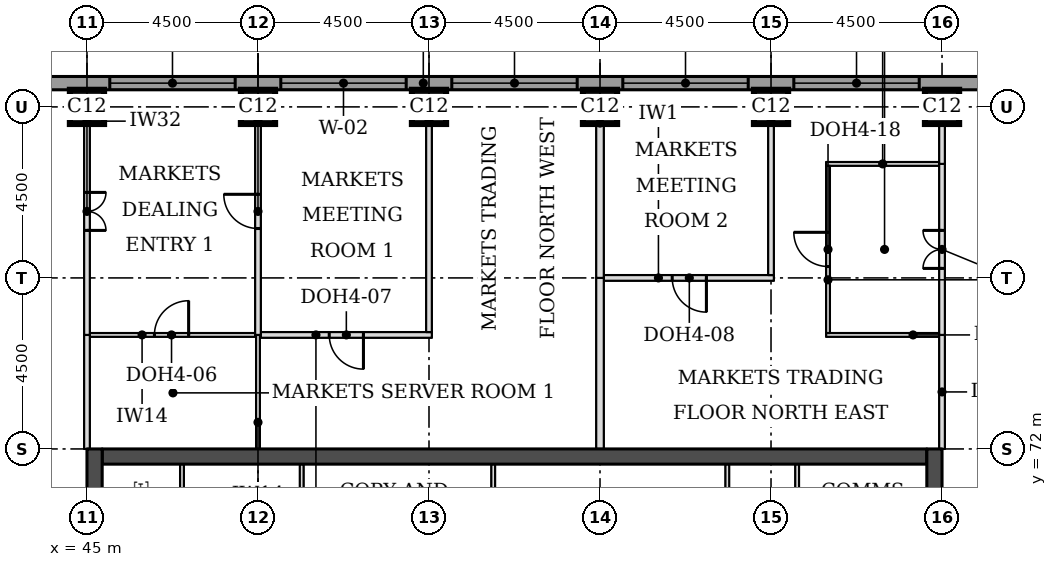
"""IFC4 building model, lengths in metres.
Left out: names, types, materials, properties, quantities, classifications, styles, units other than length and angle.
Written with IfcOpenShell. Run it as: python <this file> out.ifc"""

import sys

from ifc_helpers import new_model, si_unit, direction, frame, frame_2d, origin, origin_2d, place, context, subcontext, project, spatial, rectangle, extrude, element, fill, save


model = new_model("IFC4")
c1 = context("Model", 3, precision=1e-05, world=origin(), true_north=direction((0.0, 1.0)))
c2 = subcontext(c1, "Body", "Model", "MODEL_VIEW")
j1 = project(units=[si_unit("LENGTHUNIT", "METRE"), si_unit("PLANEANGLEUNIT", "RADIAN")], contexts=[c1])
p1 = place(None, origin())
s1 = spatial("IfcSite", under=j1, at=p1, CompositionType="ELEMENT")
p2 = place(p1, origin())
s2 = spatial("IfcBuilding", under=s1, at=p2, CompositionType="ELEMENT")
p3 = place(p2, frame((0.0, 0.0, 173.6)))
s3 = spatial("IfcBuildingStorey", under=s2, at=p3, CompositionType="ELEMENT", Elevation=173.6)
for number, where, z_axis, x_axis in (
    (1, (45.0, 81.0, 0.0), (0.0, 0.0, 1.0), (1.0, 0.0, 0.0)),
    (2, (49.5, 81.0, 0.0), (0.0, 0.0, 1.0), (1.0, 0.0, 0.0)),
    (3, (54.0, 81.0, 0.0), (0.0, 0.0, 1.0), (1.0, 0.0, 0.0)),
    (4, (58.5, 81.0, 0.0), (0.0, 0.0, 1.0), (1.0, 0.0, 0.0)),
    (5, (63.0, 81.0, 0.0), (0.0, 0.0, 1.0), (1.0, 0.0, 0.0)),
    (6, (67.5, 81.0, 0.0), (0.0, 0.0, 1.0), (1.0, 0.0, 0.0)),
):
    element("IfcColumn", number, at=place(p3, frame(where, z_axis=z_axis, x_axis=x_axis)), inside=s3, PredefinedType="COLUMN", context=c2, shape_type="SweptSolid", body=[
        extrude(rectangle(XDim=0.9, YDim=0.9, at=origin_2d()), origin(), (0.0, 0.0, 1.0), 3.7),
    ])
p4 = place(p3, frame((45.4, 71.8, 0.0), z_axis=(0.0, 0.0, 1.0), x_axis=(1.0, 0.0, 0.0)))
e7 = element("IfcWall", 7, at=p4, inside=s3, PredefinedType="SHEAR", context=c2, shape_type="SweptSolid", body=[
    extrude(rectangle(XDim=21.7, YDim=0.4, at=frame_2d((10.85, 0.0))), origin(), (0.0, 0.0, 1.0), 3.7),
])
p5 = place(p3, frame((45.2, 49.5, 0.0), z_axis=(0.0, 0.0, 1.0), x_axis=(0.0, 1.0, 0.0)))
e8 = element("IfcWall", 8, at=p5, inside=s3, PredefinedType="SHEAR", context=c2, shape_type="SweptSolid", body=[
    extrude(rectangle(XDim=22.5, YDim=0.4, at=frame_2d((11.25, 0.0))), origin(), (0.0, 0.0, 1.0), 3.7),
])
p6 = place(p5, frame((4.2, 0.0, 0.0)))
e9 = element("IfcOpeningElement", 9, at=p6, cuts=e8, PredefinedType="OPENING", context=c2, shape_type="SweptSolid", body=[
    extrude(rectangle(XDim=1.8, YDim=2.1, at=frame_2d((0.9, 1.05))), frame((0.0, 0.21, 0.0), z_axis=(0.0, -1.0, 0.0), x_axis=(1.0, 0.0, 0.0)), (0.0, 0.0, 1.0), 0.42),
])
p7 = place(p5, frame((6.9, 0.0, 0.0)))
e10 = element("IfcOpeningElement", 10, at=p7, cuts=e8, PredefinedType="OPENING", context=c2, shape_type="SweptSolid", body=[
    extrude(rectangle(XDim=1.1, YDim=2.1, at=frame_2d((0.55, 1.05))), frame((0.0, 0.21, 0.0), z_axis=(0.0, -1.0, 0.0), x_axis=(1.0, 0.0, 0.0)), (0.0, 0.0, 1.0), 0.42),
])
p8 = place(p5, frame((13.6, 0.0, 0.0)))
e11 = element("IfcOpeningElement", 11, at=p8, cuts=e8, PredefinedType="OPENING", context=c2, shape_type="SweptSolid", body=[
    extrude(rectangle(XDim=1.1, YDim=2.1, at=frame_2d((0.55, 1.05))), frame((0.0, 0.21, 0.0), z_axis=(0.0, -1.0, 0.0), x_axis=(1.0, 0.0, 0.0)), (0.0, 0.0, 1.0), 0.42),
])
p9 = place(p5, frame((16.5, 0.0, 0.0)))
e12 = element("IfcOpeningElement", 12, at=p9, cuts=e8, PredefinedType="OPENING", context=c2, shape_type="SweptSolid", body=[
    extrude(rectangle(XDim=1.8, YDim=2.1, at=frame_2d((0.9, 1.05))), frame((0.0, 0.21, 0.0), z_axis=(0.0, -1.0, 0.0), x_axis=(1.0, 0.0, 0.0)), (0.0, 0.0, 1.0), 0.42),
])
p10 = place(p3, frame((67.3, 49.5, 0.0), z_axis=(0.0, 0.0, 1.0), x_axis=(0.0, 1.0, 0.0)))
e13 = element("IfcWall", 13, at=p10, inside=s3, PredefinedType="SHEAR", context=c2, shape_type="SweptSolid", body=[
    extrude(rectangle(XDim=22.5, YDim=0.4, at=frame_2d((11.25, 0.0))), origin(), (0.0, 0.0, 1.0), 3.7),
])
p11 = place(p10, frame((4.2, 0.0, 0.0)))
e14 = element("IfcOpeningElement", 14, at=p11, cuts=e13, PredefinedType="OPENING", context=c2, shape_type="SweptSolid", body=[
    extrude(rectangle(XDim=1.8, YDim=2.1, at=frame_2d((0.9, 1.05))), frame((0.0, 0.21, 0.0), z_axis=(0.0, -1.0, 0.0), x_axis=(1.0, 0.0, 0.0)), (0.0, 0.0, 1.0), 0.42),
])
p12 = place(p10, frame((6.9, 0.0, 0.0)))
e15 = element("IfcOpeningElement", 15, at=p12, cuts=e13, PredefinedType="OPENING", context=c2, shape_type="SweptSolid", body=[
    extrude(rectangle(XDim=1.1, YDim=2.1, at=frame_2d((0.55, 1.05))), frame((0.0, 0.21, 0.0), z_axis=(0.0, -1.0, 0.0), x_axis=(1.0, 0.0, 0.0)), (0.0, 0.0, 1.0), 0.42),
])
p13 = place(p10, frame((13.6, 0.0, 0.0)))
e16 = element("IfcOpeningElement", 16, at=p13, cuts=e13, PredefinedType="OPENING", context=c2, shape_type="SweptSolid", body=[
    extrude(rectangle(XDim=1.1, YDim=2.1, at=frame_2d((0.55, 1.05))), frame((0.0, 0.21, 0.0), z_axis=(0.0, -1.0, 0.0), x_axis=(1.0, 0.0, 0.0)), (0.0, 0.0, 1.0), 0.42),
])
p14 = place(p10, frame((16.5, 0.0, 0.0)))
e17 = element("IfcOpeningElement", 17, at=p14, cuts=e13, PredefinedType="OPENING", context=c2, shape_type="SweptSolid", body=[
    extrude(rectangle(XDim=1.8, YDim=2.1, at=frame_2d((0.9, 1.05))), frame((0.0, 0.21, 0.0), z_axis=(0.0, -1.0, 0.0), x_axis=(1.0, 0.0, 0.0)), (0.0, 0.0, 1.0), 0.42),
])
p15 = place(p3, frame((72.331, 81.625, 0.0), z_axis=(0.0, 0.0, 1.0), x_axis=(-1.0, 0.0, 0.0)))
e18 = element("IfcWall", 18, at=p15, inside=s3, PredefinedType="STANDARD", context=c2, shape_type="SweptSolid", body=[
    extrude(rectangle(XDim=32.163, YDim=0.35, at=frame_2d((16.081, 0.0))), origin(), (0.0, 0.0, 1.0), 3.525),
])
p16 = place(p15, frame((5.431, 0.0, 0.9)))
e19 = element("IfcOpeningElement", 19, at=p16, cuts=e18, PredefinedType="OPENING", context=c2, shape_type="SweptSolid", body=[
    extrude(rectangle(XDim=3.3, YDim=1.9, at=frame_2d((1.65, 0.95))), frame((0.0, 0.185, 0.0), z_axis=(0.0, -1.0, 0.0), x_axis=(1.0, 0.0, 0.0)), (0.0, 0.0, 1.0), 0.37),
])
p17 = place(p15, frame((9.931, 0.0, 0.9)))
e20 = element("IfcOpeningElement", 20, at=p17, cuts=e18, PredefinedType="OPENING", context=c2, shape_type="SweptSolid", body=[
    extrude(rectangle(XDim=3.3, YDim=1.9, at=frame_2d((1.65, 0.95))), frame((0.0, 0.185, 0.0), z_axis=(0.0, -1.0, 0.0), x_axis=(1.0, 0.0, 0.0)), (0.0, 0.0, 1.0), 0.37),
])
p18 = place(p15, frame((14.431, 0.0, 0.9)))
e21 = element("IfcOpeningElement", 21, at=p18, cuts=e18, PredefinedType="OPENING", context=c2, shape_type="SweptSolid", body=[
    extrude(rectangle(XDim=3.3, YDim=1.9, at=frame_2d((1.65, 0.95))), frame((0.0, 0.185, 0.0), z_axis=(0.0, -1.0, 0.0), x_axis=(1.0, 0.0, 0.0)), (0.0, 0.0, 1.0), 0.37),
])
p19 = place(p15, frame((18.931, 0.0, 0.9)))
e22 = element("IfcOpeningElement", 22, at=p19, cuts=e18, PredefinedType="OPENING", context=c2, shape_type="SweptSolid", body=[
    extrude(rectangle(XDim=3.3, YDim=1.9, at=frame_2d((1.65, 0.95))), frame((0.0, 0.185, 0.0), z_axis=(0.0, -1.0, 0.0), x_axis=(1.0, 0.0, 0.0)), (0.0, 0.0, 1.0), 0.37),
])
p20 = place(p15, frame((23.431, 0.0, 0.9)))
e23 = element("IfcOpeningElement", 23, at=p20, cuts=e18, PredefinedType="OPENING", context=c2, shape_type="SweptSolid", body=[
    extrude(rectangle(XDim=3.3, YDim=1.9, at=frame_2d((1.65, 0.95))), frame((0.0, 0.185, 0.0), z_axis=(0.0, -1.0, 0.0), x_axis=(1.0, 0.0, 0.0)), (0.0, 0.0, 1.0), 0.37),
])
p21 = place(p3, frame((45.075, 75.0, 0.0), z_axis=(0.0, 0.0, 1.0), x_axis=(1.0, 0.0, 0.0)))
e24 = element("IfcWall", 24, at=p21, inside=s3, PredefinedType="PARTITIONING", context=c2, shape_type="SweptSolid", body=[
    extrude(rectangle(XDim=4.35, YDim=0.1, at=frame_2d((2.175, 0.0))), origin(), (0.0, 0.0, 1.0), 3.55),
])
p22 = place(p21, frame((1.7, 0.0, 0.0)))
e25 = element("IfcOpeningElement", 25, at=p22, cuts=e24, PredefinedType="OPENING", context=c2, shape_type="SweptSolid", body=[
    extrude(rectangle(XDim=0.9, YDim=2.1, at=frame_2d((0.45, 1.05))), frame((0.0, 0.06, 0.0), z_axis=(0.0, -1.0, 0.0), x_axis=(1.0, 0.0, 0.0)), (0.0, 0.0, 1.0), 0.12),
])
p23 = place(p3, frame((49.575, 75.0, 0.0), z_axis=(0.0, 0.0, 1.0), x_axis=(1.0, 0.0, 0.0)))
e26 = element("IfcWall", 26, at=p23, inside=s3, PredefinedType="PARTITIONING", context=c2, shape_type="SweptSolid", body=[
    extrude(rectangle(XDim=4.5, YDim=0.15, at=frame_2d((2.25, 0.0))), origin(), (0.0, 0.0, 1.0), 3.55),
])
p24 = place(p23, frame((1.8, 0.0, 0.0)))
e27 = element("IfcOpeningElement", 27, at=p24, cuts=e26, PredefinedType="OPENING", context=c2, shape_type="SweptSolid", body=[
    extrude(rectangle(XDim=0.9, YDim=2.1, at=frame_2d((0.45, 1.05))), frame((0.0, 0.085, 0.0), z_axis=(0.0, -1.0, 0.0), x_axis=(1.0, 0.0, 0.0)), (0.0, 0.0, 1.0), 0.17),
])
p25 = place(p3, frame((64.45, 75.0, 0.0), z_axis=(0.0, 0.0, 1.0), x_axis=(1.0, 0.0, 0.0)))
e28 = element("IfcWall", 28, at=p25, inside=s3, PredefinedType="PARTITIONING", context=c2, shape_type="SweptSolid", body=[
    extrude(rectangle(XDim=2.975, YDim=0.1, at=frame_2d((1.488, 0.0))), origin(), (0.0, 0.0, 1.0), 3.55),
])
p26 = place(p3, frame((58.6, 76.5, 0.0), z_axis=(0.0, 0.0, 1.0), x_axis=(1.0, 0.0, 0.0)))
e29 = element("IfcWall", 29, at=p26, inside=s3, PredefinedType="PARTITIONING", context=c2, shape_type="SweptSolid", body=[
    extrude(rectangle(XDim=4.475, YDim=0.15, at=frame_2d((2.237, 0.0))), origin(), (0.0, 0.0, 1.0), 3.55),
])
p27 = place(p26, frame((1.8, 0.0, 0.0)))
e30 = element("IfcOpeningElement", 30, at=p27, cuts=e29, PredefinedType="OPENING", context=c2, shape_type="SweptSolid", body=[
    extrude(rectangle(XDim=0.9, YDim=2.1, at=frame_2d((0.45, 1.05))), frame((0.0, 0.085, 0.0), z_axis=(0.0, -1.0, 0.0), x_axis=(1.0, 0.0, 0.0)), (0.0, 0.0, 1.0), 0.17),
])
p28 = place(p3, frame((64.45, 79.5, 0.0), z_axis=(0.0, 0.0, 1.0), x_axis=(1.0, 0.0, 0.0)))
e31 = element("IfcWall", 31, at=p28, inside=s3, PredefinedType="PARTITIONING", context=c2, shape_type="SweptSolid", body=[
    extrude(rectangle(XDim=2.975, YDim=0.1, at=frame_2d((1.488, 0.0))), origin(), (0.0, 0.0, 1.0), 3.55),
])
p29 = place(p3, frame((45.0, 72.0, 0.0), z_axis=(0.0, 0.0, 1.0), x_axis=(0.0, 1.0, 0.0)))
e32 = element("IfcWall", 32, at=p29, inside=s3, PredefinedType="PARTITIONING", context=c2, shape_type="SweptSolid", body=[
    extrude(rectangle(XDim=3.0, YDim=0.15, at=frame_2d((1.5, 0.0))), origin(), (0.0, 0.0, 1.0), 3.022),
])
p30 = place(p3, frame((49.5, 72.0, 0.0), z_axis=(0.0, 0.0, 1.0), x_axis=(0.0, 1.0, 0.0)))
e33 = element("IfcWall", 33, at=p30, inside=s3, PredefinedType="PARTITIONING", context=c2, shape_type="SweptSolid", body=[
    extrude(rectangle(XDim=3.0, YDim=0.1, at=frame_2d((1.5, 0.0))), origin(), (0.0, 0.0, 1.0), 3.55),
])
p31 = place(p3, frame((58.5, 72.0, 0.0), z_axis=(0.0, 0.0, 1.0), x_axis=(0.0, 1.0, 0.0)))
e34 = element("IfcWall", 34, at=p31, inside=s3, PredefinedType="PARTITIONING", context=c2, shape_type="SweptSolid", body=[
    extrude(rectangle(XDim=4.5, YDim=0.2, at=frame_2d((2.25, 0.0))), origin(), (0.0, 0.0, 1.0), 3.55),
])
p32 = place(p3, frame((67.5, 72.0, 0.0), z_axis=(0.0, 0.0, 1.0), x_axis=(0.0, 1.0, 0.0)))
e35 = element("IfcWall", 35, at=p32, inside=s3, PredefinedType="PARTITIONING", context=c2, shape_type="SweptSolid", body=[
    extrude(rectangle(XDim=3.0, YDim=0.15, at=frame_2d((1.5, 0.0))), origin(), (0.0, 0.0, 1.0), 3.022),
])
p33 = place(p3, frame((45.0, 75.0, 0.0), z_axis=(0.0, 0.0, 1.0), x_axis=(0.0, 1.0, 0.0)))
e36 = element("IfcWall", 36, at=p33, inside=s3, PredefinedType="PARTITIONING", context=c2, shape_type="SweptSolid", body=[
    extrude(rectangle(XDim=6.45, YDim=0.15, at=frame_2d((3.225, 0.0))), origin(), (0.0, 0.0, 1.0), 3.022),
])
p34 = place(p33, frame((2.75, 0.0, 0.0)))
e37 = element("IfcOpeningElement", 37, at=p34, cuts=e36, PredefinedType="OPENING", context=c2, shape_type="SweptSolid", body=[
    extrude(rectangle(XDim=1.0, YDim=2.1, at=frame_2d((0.5, 1.05))), frame((0.0, 0.085, 0.0), z_axis=(0.0, -1.0, 0.0), x_axis=(1.0, 0.0, 0.0)), (0.0, 0.0, 1.0), 0.17),
])
p35 = place(p3, frame((49.5, 75.0, 0.0), z_axis=(0.0, 0.0, 1.0), x_axis=(0.0, 1.0, 0.0)))
e38 = element("IfcWall", 38, at=p35, inside=s3, PredefinedType="PARTITIONING", context=c2, shape_type="SweptSolid", body=[
    extrude(rectangle(XDim=6.45, YDim=0.15, at=frame_2d((3.225, 0.0))), origin(), (0.0, 0.0, 1.0), 3.55),
])
p36 = place(p35, frame((2.8, 0.0, 0.0)))
e39 = element("IfcOpeningElement", 39, at=p36, cuts=e38, PredefinedType="OPENING", context=c2, shape_type="SweptSolid", body=[
    extrude(rectangle(XDim=0.9, YDim=2.1, at=frame_2d((0.45, 1.05))), frame((0.0, 0.085, 0.0), z_axis=(0.0, -1.0, 0.0), x_axis=(1.0, 0.0, 0.0)), (0.0, 0.0, 1.0), 0.17),
])
p37 = place(p3, frame((67.5, 75.0, 0.0), z_axis=(0.0, 0.0, 1.0), x_axis=(0.0, 1.0, 0.0)))
e40 = element("IfcWall", 40, at=p37, inside=s3, PredefinedType="PARTITIONING", context=c2, shape_type="SweptSolid", body=[
    extrude(rectangle(XDim=4.5, YDim=0.15, at=frame_2d((2.25, 0.0))), origin(), (0.0, 0.0, 1.0), 3.022),
])
p38 = place(p37, frame((1.75, 0.0, 0.0)))
e41 = element("IfcOpeningElement", 41, at=p38, cuts=e40, PredefinedType="OPENING", context=c2, shape_type="SweptSolid", body=[
    extrude(rectangle(XDim=1.0, YDim=2.1, at=frame_2d((0.5, 1.05))), frame((0.0, 0.085, 0.0), z_axis=(0.0, -1.0, 0.0), x_axis=(1.0, 0.0, 0.0)), (0.0, 0.0, 1.0), 0.17),
])
p39 = place(p3, frame((64.5, 75.05, 0.0), z_axis=(0.0, 0.0, 1.0), x_axis=(0.0, 1.0, 0.0)))
e42 = element("IfcWall", 42, at=p39, inside=s3, PredefinedType="PARTITIONING", context=c2, shape_type="SweptSolid", body=[
    extrude(rectangle(XDim=4.4, YDim=0.1, at=frame_2d((2.2, 0.0))), origin(), (0.0, 0.0, 1.0), 3.55),
])
p40 = place(p39, frame((1.75, 0.0, 0.0)))
e43 = element("IfcOpeningElement", 43, at=p40, cuts=e42, PredefinedType="OPENING", context=c2, shape_type="SweptSolid", body=[
    extrude(rectangle(XDim=0.9, YDim=2.1, at=frame_2d((0.45, 1.05))), frame((0.0, 0.06, 0.0), z_axis=(0.0, -1.0, 0.0), x_axis=(1.0, 0.0, 0.0)), (0.0, 0.0, 1.0), 0.12),
])
p41 = place(p3, frame((54.0, 75.075, 0.0), z_axis=(0.0, 0.0, 1.0), x_axis=(0.0, 1.0, 0.0)))
e44 = element("IfcWall", 44, at=p41, inside=s3, PredefinedType="PARTITIONING", context=c2, shape_type="SweptSolid", body=[
    extrude(rectangle(XDim=6.375, YDim=0.15, at=frame_2d((3.188, 0.0))), origin(), (0.0, 0.0, 1.0), 3.55),
])
p42 = place(p3, frame((58.5, 76.5, 0.0), z_axis=(0.0, 0.0, 1.0), x_axis=(0.0, 1.0, 0.0)))
e45 = element("IfcWall", 45, at=p42, inside=s3, PredefinedType="PARTITIONING", context=c2, shape_type="SweptSolid", body=[
    extrude(rectangle(XDim=4.95, YDim=0.2, at=frame_2d((2.475, 0.0))), origin(), (0.0, 0.0, 1.0), 3.55),
])
p43 = place(p3, frame((63.0, 76.575, 0.0), z_axis=(0.0, 0.0, 1.0), x_axis=(0.0, 1.0, 0.0)))
e46 = element("IfcWall", 46, at=p43, inside=s3, PredefinedType="PARTITIONING", context=c2, shape_type="SweptSolid", body=[
    extrude(rectangle(XDim=4.875, YDim=0.15, at=frame_2d((2.438, 0.0))), origin(), (0.0, 0.0, 1.0), 3.55),
])
p44 = place(p3, frame((67.5, 79.5, 0.0), z_axis=(0.0, 0.0, 1.0), x_axis=(0.0, 1.0, 0.0)))
e47 = element("IfcWall", 47, at=p44, inside=s3, PredefinedType="PARTITIONING", context=c2, shape_type="SweptSolid", body=[
    extrude(rectangle(XDim=1.95, YDim=0.15, at=frame_2d((0.975, 0.0))), origin(), (0.0, 0.0, 1.0), 3.022),
])
for number, where, z_axis, x_axis in (
    (48, (47.5, 68.5, 0.0), (0.0, 0.0, 1.0), (0.0, 1.0, 0.0)),
    (49, (50.65, 68.5, 0.0), (0.0, 0.0, 1.0), (0.0, 1.0, 0.0)),
    (50, (55.69, 68.5, 0.0), (0.0, 0.0, 1.0), (0.0, 1.0, 0.0)),
    (51, (61.85, 68.5, 0.0), (0.0, 0.0, 1.0), (0.0, 1.0, 0.0)),
    (52, (63.688, 68.5, 0.0), (0.0, 0.0, 1.0), (0.0, 1.0, 0.0)),
):
    element("IfcWall", number, at=place(p3, frame(where, z_axis=z_axis, x_axis=x_axis)), inside=s3, PredefinedType="PARTITIONING", context=c2, shape_type="SweptSolid", body=[
        extrude(rectangle(XDim=3.1, YDim=0.1, at=frame_2d((1.55, 0.0))), origin(), (0.0, 0.0, 1.0), 3.55),
    ])
p45 = place(p16, origin())
e53 = element("IfcWindow", 53, at=p45, inside=s3, PartitioningType="SINGLE_PANEL", PredefinedType="WINDOW", context=c2, shape_type="SweptSolid", body=[
    extrude(rectangle(XDim=3.3, YDim=1.9, at=frame_2d((1.65, 0.95))), frame((0.0, 0.085, 0.0), z_axis=(0.0, -1.0, 0.0), x_axis=(1.0, 0.0, 0.0)), (0.0, 0.0, 1.0), 0.06),
])
fill(e19, e53)
p46 = place(p17, origin())
e54 = element("IfcWindow", 54, at=p46, inside=s3, PartitioningType="SINGLE_PANEL", PredefinedType="WINDOW", context=c2, shape_type="SweptSolid", body=[
    extrude(rectangle(XDim=3.3, YDim=1.9, at=frame_2d((1.65, 0.95))), frame((0.0, 0.085, 0.0), z_axis=(0.0, -1.0, 0.0), x_axis=(1.0, 0.0, 0.0)), (0.0, 0.0, 1.0), 0.06),
])
fill(e20, e54)
p47 = place(p18, origin())
e55 = element("IfcWindow", 55, at=p47, inside=s3, PartitioningType="SINGLE_PANEL", PredefinedType="WINDOW", context=c2, shape_type="SweptSolid", body=[
    extrude(rectangle(XDim=3.3, YDim=1.9, at=frame_2d((1.65, 0.95))), frame((0.0, 0.085, 0.0), z_axis=(0.0, -1.0, 0.0), x_axis=(1.0, 0.0, 0.0)), (0.0, 0.0, 1.0), 0.06),
])
fill(e21, e55)
p48 = place(p19, origin())
e56 = element("IfcWindow", 56, at=p48, inside=s3, PartitioningType="SINGLE_PANEL", PredefinedType="WINDOW", context=c2, shape_type="SweptSolid", body=[
    extrude(rectangle(XDim=3.3, YDim=1.9, at=frame_2d((1.65, 0.95))), frame((0.0, 0.085, 0.0), z_axis=(0.0, -1.0, 0.0), x_axis=(1.0, 0.0, 0.0)), (0.0, 0.0, 1.0), 0.06),
])
fill(e22, e56)
p49 = place(p20, origin())
e57 = element("IfcWindow", 57, at=p49, inside=s3, PartitioningType="SINGLE_PANEL", PredefinedType="WINDOW", context=c2, shape_type="SweptSolid", body=[
    extrude(rectangle(XDim=3.3, YDim=1.9, at=frame_2d((1.65, 0.95))), frame((0.0, 0.085, 0.0), z_axis=(0.0, -1.0, 0.0), x_axis=(1.0, 0.0, 0.0)), (0.0, 0.0, 1.0), 0.06),
])
fill(e23, e57)
p50 = place(p34, frame((1.0, 0.0, 0.0), z_axis=(0.0, 0.0, 1.0), x_axis=(-1.0, 0.0, 0.0)))
e58 = element("IfcDoor", 58, at=p50, inside=s3, OperationType="DOUBLE_DOOR_SINGLE_SWING", PredefinedType="DOOR", context=c2, shape_type="SweptSolid", body=[
    extrude(rectangle(XDim=1.0, YDim=2.1, at=frame_2d((0.5, 1.05))), frame((0.0, 0.025, 0.0), z_axis=(0.0, -1.0, 0.0), x_axis=(1.0, 0.0, 0.0)), (0.0, 0.0, 1.0), 0.05),
])
fill(e37, e58)
p51 = place(p36, origin())
e59 = element("IfcDoor", 59, at=p51, inside=s3, OperationType="SINGLE_SWING_RIGHT", PredefinedType="DOOR", context=c2, shape_type="SweptSolid", body=[
    extrude(rectangle(XDim=0.9, YDim=2.1, at=frame_2d((0.45, 1.05))), frame((0.0, 0.025, 0.0), z_axis=(0.0, -1.0, 0.0), x_axis=(1.0, 0.0, 0.0)), (0.0, 0.0, 1.0), 0.05),
])
fill(e39, e59)
p52 = place(p22, origin())
e60 = element("IfcDoor", 60, at=p52, inside=s3, OperationType="SINGLE_SWING_RIGHT", PredefinedType="DOOR", context=c2, shape_type="SweptSolid", body=[
    extrude(rectangle(XDim=0.9, YDim=2.1, at=frame_2d((0.45, 1.05))), frame((0.0, 0.025, 0.0), z_axis=(0.0, -1.0, 0.0), x_axis=(1.0, 0.0, 0.0)), (0.0, 0.0, 1.0), 0.05),
])
fill(e25, e60)
p53 = place(p24, frame((0.9, 0.0, 0.0), z_axis=(0.0, 0.0, 1.0), x_axis=(-1.0, 0.0, 0.0)))
e61 = element("IfcDoor", 61, at=p53, inside=s3, OperationType="SINGLE_SWING_LEFT", PredefinedType="DOOR", context=c2, shape_type="SweptSolid", body=[
    extrude(rectangle(XDim=0.9, YDim=2.1, at=frame_2d((0.45, 1.05))), frame((0.0, 0.025, 0.0), z_axis=(0.0, -1.0, 0.0), x_axis=(1.0, 0.0, 0.0)), (0.0, 0.0, 1.0), 0.05),
])
fill(e27, e61)
p54 = place(p38, origin())
e62 = element("IfcDoor", 62, at=p54, inside=s3, OperationType="DOUBLE_DOOR_SINGLE_SWING", PredefinedType="DOOR", context=c2, shape_type="SweptSolid", body=[
    extrude(rectangle(XDim=1.0, YDim=2.1, at=frame_2d((0.5, 1.05))), frame((0.0, 0.025, 0.0), z_axis=(0.0, -1.0, 0.0), x_axis=(1.0, 0.0, 0.0)), (0.0, 0.0, 1.0), 0.05),
])
fill(e41, e62)
p55 = place(p40, origin())
e63 = element("IfcDoor", 63, at=p55, inside=s3, OperationType="SINGLE_SWING_RIGHT", PredefinedType="DOOR", context=c2, shape_type="SweptSolid", body=[
    extrude(rectangle(XDim=0.9, YDim=2.1, at=frame_2d((0.45, 1.05))), frame((0.0, 0.025, 0.0), z_axis=(0.0, -1.0, 0.0), x_axis=(1.0, 0.0, 0.0)), (0.0, 0.0, 1.0), 0.05),
])
fill(e43, e63)
p56 = place(p27, frame((0.9, 0.0, 0.0), z_axis=(0.0, 0.0, 1.0), x_axis=(-1.0, 0.0, 0.0)))
e64 = element("IfcDoor", 64, at=p56, inside=s3, OperationType="SINGLE_SWING_LEFT", PredefinedType="DOOR", context=c2, shape_type="SweptSolid", body=[
    extrude(rectangle(XDim=0.9, YDim=2.1, at=frame_2d((0.45, 1.05))), frame((0.0, 0.025, 0.0), z_axis=(0.0, -1.0, 0.0), x_axis=(1.0, 0.0, 0.0)), (0.0, 0.0, 1.0), 0.05),
])
fill(e30, e64)
save(model, sys.argv[1])
